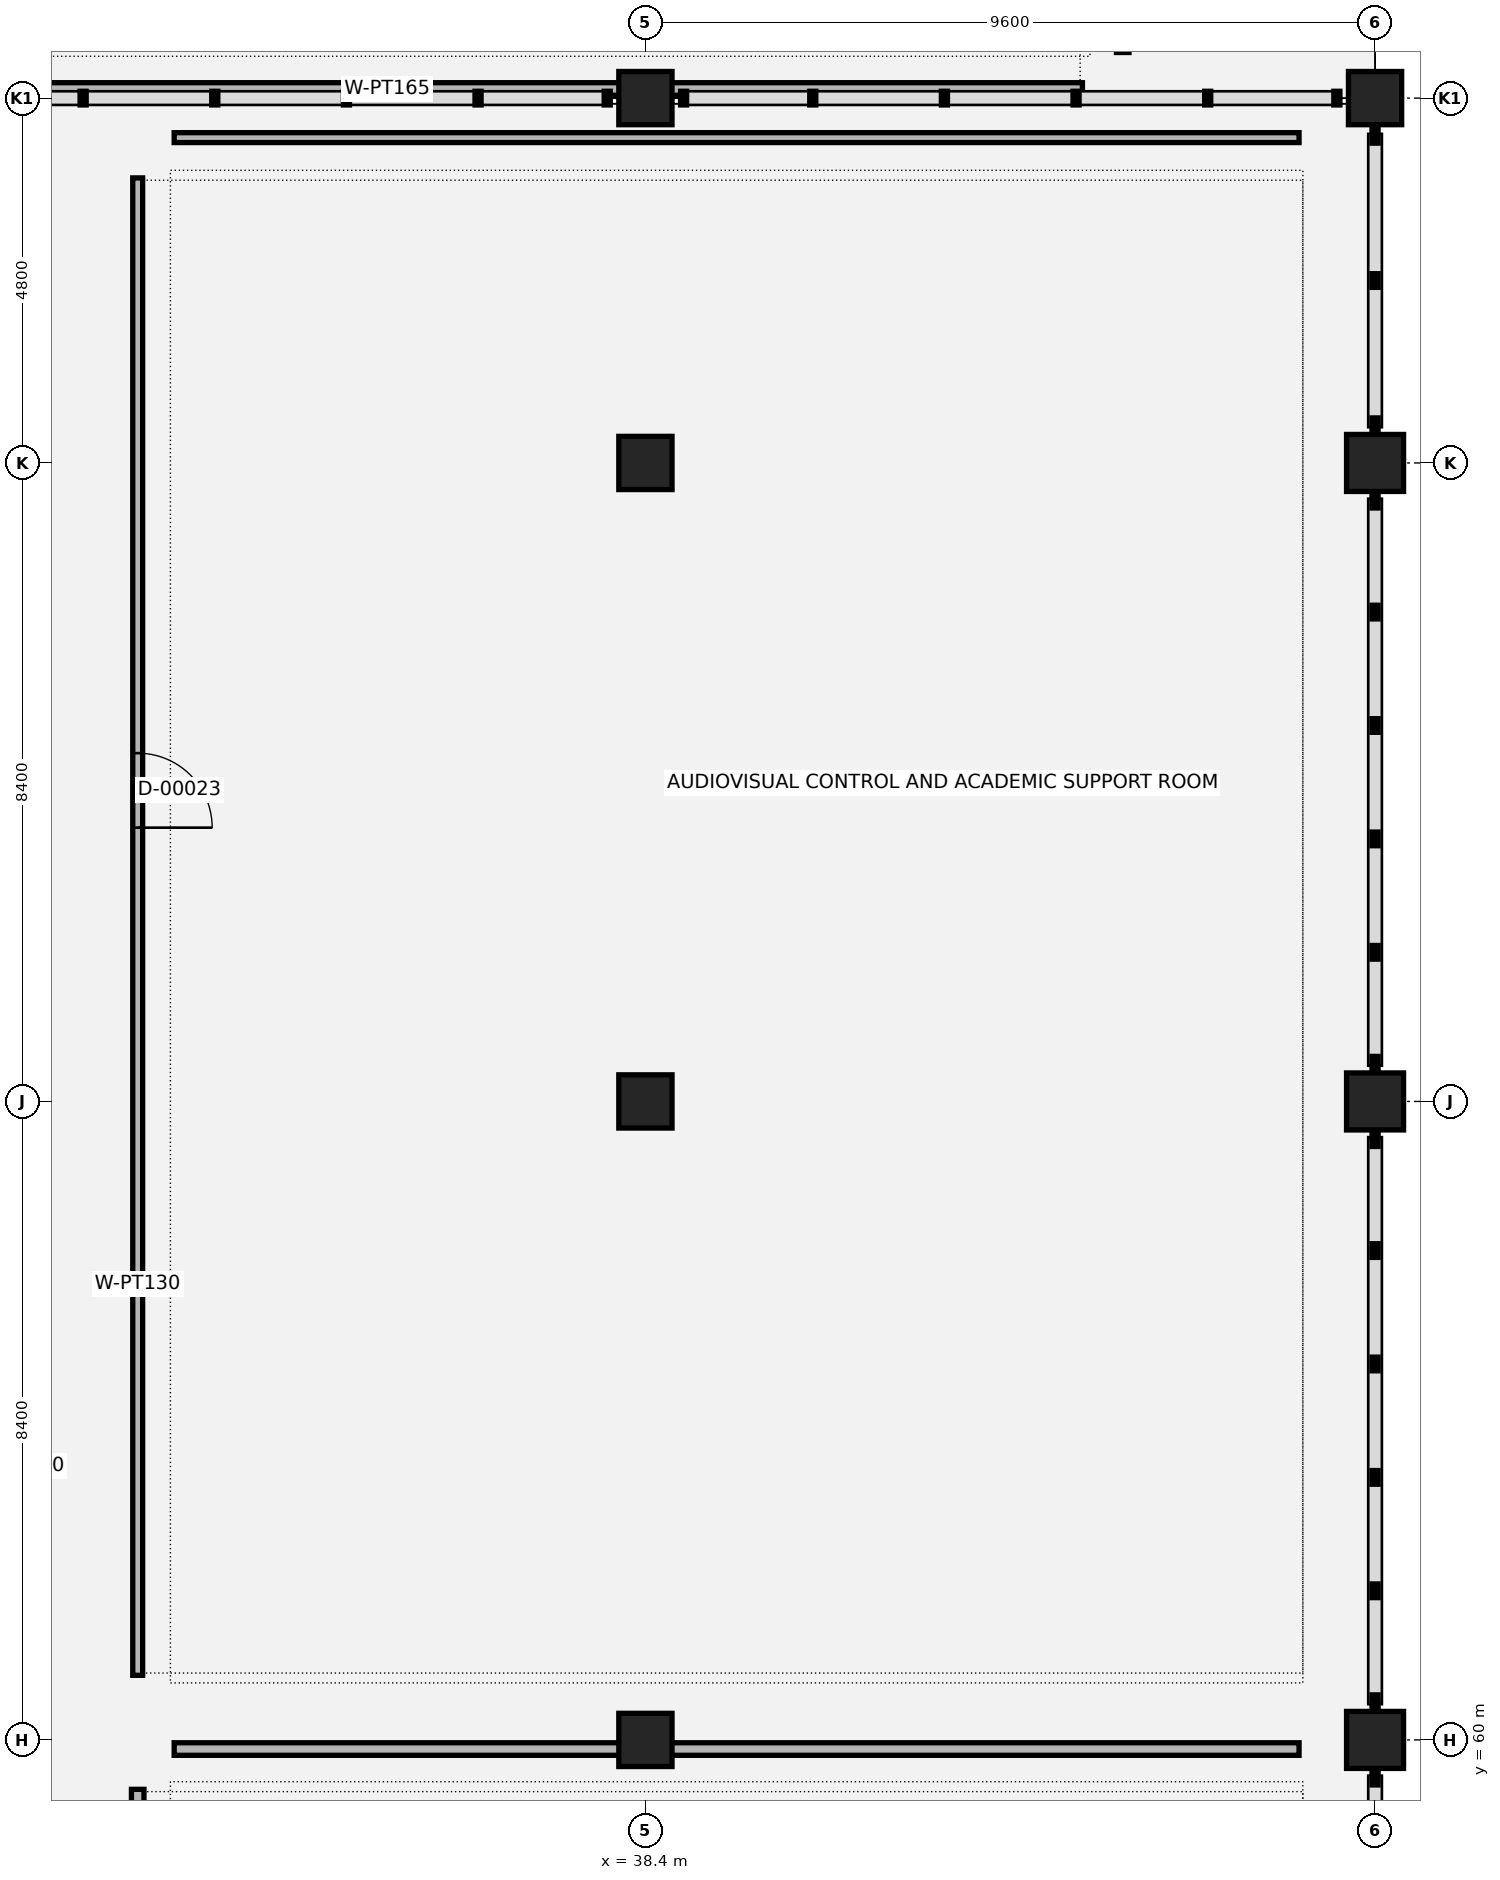
"""IFC4 building model, lengths in metres.
Left out: names, types, materials, properties, quantities, classifications, styles, units other than length and angle.
Written with IfcOpenShell. Run it as: python <this file> out.ifc"""

import sys

from ifc_helpers import new_model, si_unit, direction, frame, frame_2d, origin, origin_2d, place, context, subcontext, project, spatial, rectangle, extrude, element, fill, save


model = new_model("IFC4")
c1 = context("Model", 3, precision=1e-05, world=origin(), true_north=direction((0.0, 1.0)))
c2 = subcontext(c1, "Body", "Model", "MODEL_VIEW")
j1 = project(units=[si_unit("LENGTHUNIT", "METRE"), si_unit("PLANEANGLEUNIT", "RADIAN")], contexts=[c1])
p1 = place(None, origin())
s1 = spatial("IfcSite", under=j1, at=p1, CompositionType="ELEMENT")
p2 = place(p1, origin())
s2 = spatial("IfcBuilding", under=s1, at=p2, CompositionType="ELEMENT")
p3 = place(p2, origin())
s3 = spatial("IfcBuildingStorey", under=s2, at=p3, CompositionType="ELEMENT", Elevation=0.0)
for number, where, z_axis, x_axis in (
    (1, (38.4, 60.0, 0.0), (0.0, 0.0, 1.0), (1.0, 0.0, 0.0)),
    (2, (38.4, 68.4, 0.0), (0.0, 0.0, 1.0), (1.0, 0.0, 0.0)),
    (3, (38.4, 76.8, 0.0), (0.0, 0.0, 1.0), (1.0, 0.0, 0.0)),
    (4, (38.4, 81.6, 0.0), (0.0, 0.0, 1.0), (1.0, 0.0, 0.0)),
):
    element("IfcColumn", number, at=place(p3, frame(where, z_axis=z_axis, x_axis=x_axis)), inside=s3, PredefinedType="COLUMN", context=c2, shape_type="SweptSolid", body=[
        extrude(rectangle(XDim=0.7, YDim=0.7, at=origin_2d()), origin(), (0.0, 0.0, 1.0), 5.4),
    ])
for number, where, z_axis, x_axis in (
    (5, (48.0, 60.0, 0.0), (0.0, 0.0, 1.0), (1.0, 0.0, 0.0)),
    (6, (48.0, 68.4, 0.0), (0.0, 0.0, 1.0), (1.0, 0.0, 0.0)),
    (7, (48.0, 76.8, 0.0), (0.0, 0.0, 1.0), (1.0, 0.0, 0.0)),
):
    element("IfcColumn", number, at=place(p3, frame(where, z_axis=z_axis, x_axis=x_axis)), inside=s3, PredefinedType="COLUMN", context=c2, shape_type="SweptSolid", body=[
        extrude(rectangle(XDim=0.75, YDim=0.75, at=origin_2d()), origin(), (0.0, 0.0, 1.0), 5.4),
    ])
p4 = place(p3, frame((48.0, 81.6, 0.0), z_axis=(0.0, 0.0, 1.0), x_axis=(1.0, 0.0, 0.0)))
e8 = element("IfcColumn", 8, at=p4, inside=s3, PredefinedType="COLUMN", context=c2, shape_type="SweptSolid", body=[
    extrude(rectangle(XDim=0.7, YDim=0.7, at=origin_2d()), origin(), (0.0, 0.0, 1.0), 5.4),
])
p5 = place(p3, frame((19.85, 81.72, 0.0), z_axis=(0.0, 0.0, 1.0), x_axis=(1.0, 0.0, 0.0)))
e9 = element("IfcWall", 9, at=p5, inside=s3, PredefinedType="PARTITIONING", context=c2, shape_type="SweptSolid", body=[
    extrude(rectangle(XDim=24.3, YDim=0.165, at=frame_2d((12.15, 0.0))), origin(), (0.0, 0.0, 1.0), 4.04),
])
p6 = place(p5, frame((3.73, 0.0, 0.0)))
e10 = element("IfcOpeningElement", 10, at=p6, cuts=e9, PredefinedType="OPENING", context=c2, shape_type="SweptSolid", body=[
    extrude(rectangle(XDim=1.3, YDim=2.15, at=frame_2d((0.65, 1.075))), frame((0.0, 0.093, 0.0), z_axis=(0.0, -1.0, 0.0), x_axis=(1.0, 0.0, 0.0)), (0.0, 0.0, 1.0), 0.185),
])
p7 = place(p3, frame((31.72, 39.25, 0.0), z_axis=(0.0, 0.0, 1.0), x_axis=(0.0, 1.0, 0.0)))
e11 = element("IfcWall", 11, at=p7, inside=s3, PredefinedType="PARTITIONING", context=c2, shape_type="SweptSolid", body=[
    extrude(rectangle(XDim=20.1, YDim=0.165, at=frame_2d((10.05, 0.0))), origin(), (0.0, 0.0, 1.0), 4.04),
])
p8 = place(p7, frame((7.632, 0.0, 0.0)))
e12 = element("IfcOpeningElement", 12, at=p8, cuts=e11, PredefinedType="OPENING", context=c2, shape_type="SweptSolid", body=[
    extrude(rectangle(XDim=1.22, YDim=2.15, at=frame_2d((0.61, 1.075))), frame((0.0, 0.093, 0.0), z_axis=(0.0, -1.0, 0.0), x_axis=(1.0, 0.0, 0.0)), (0.0, 0.0, 1.0), 0.185),
])
p9 = place(p3, frame((32.2, 59.88, 0.0), z_axis=(0.0, 0.0, 1.0), x_axis=(1.0, 0.0, 0.0)))
e13 = element("IfcWall", 13, at=p9, inside=s3, PredefinedType="PARTITIONING", context=c2, shape_type="SweptSolid", body=[
    extrude(rectangle(XDim=14.8, YDim=0.165, at=frame_2d((7.4, 0.0))), origin(), (0.0, 0.0, 1.0), 4.04),
])
p10 = place(p3, frame((31.72, 60.85, 0.0), z_axis=(0.0, 0.0, 1.0), x_axis=(0.0, 1.0, 0.0)))
e14 = element("IfcWall", 14, at=p10, inside=s3, PredefinedType="PARTITIONING", context=c2, shape_type="SweptSolid", body=[
    extrude(rectangle(XDim=19.7, YDim=0.13, at=frame_2d((9.85, 0.0))), origin(), (0.0, 0.0, 1.0), 4.04),
])
p11 = place(p10, frame((11.152, 0.0, 0.0)))
e15 = element("IfcOpeningElement", 15, at=p11, cuts=e14, PredefinedType="OPENING", context=c2, shape_type="SweptSolid", body=[
    extrude(rectangle(XDim=0.98, YDim=2.1, at=frame_2d((0.49, 1.05))), frame((0.0, 0.075, 0.0), z_axis=(0.0, -1.0, 0.0), x_axis=(1.0, 0.0, 0.0)), (0.0, 0.0, 1.0), 0.15),
])
p12 = place(p3, frame((32.2, 81.08, 0.0), z_axis=(0.0, 0.0, 1.0), x_axis=(1.0, 0.0, 0.0)))
e16 = element("IfcWall", 16, at=p12, inside=s3, PredefinedType="PARTITIONING", context=c2, shape_type="SweptSolid", body=[
    extrude(rectangle(XDim=14.8, YDim=0.13, at=frame_2d((7.4, 0.0))), origin(), (0.0, 0.0, 1.0), 4.04),
])
p13 = place(p11, origin())
e17 = element("IfcDoor", 17, at=p13, inside=s3, OperationType="SINGLE_SWING_RIGHT", PredefinedType="DOOR", context=c2, shape_type="SweptSolid", body=[
    extrude(rectangle(XDim=0.98, YDim=2.1, at=frame_2d((0.49, 1.05))), frame((0.0, 0.025, 0.0), z_axis=(0.0, -1.0, 0.0), x_axis=(1.0, 0.0, 0.0)), (0.0, 0.0, 1.0), 0.05),
])
fill(e15, e17)
save(model, sys.argv[1])
